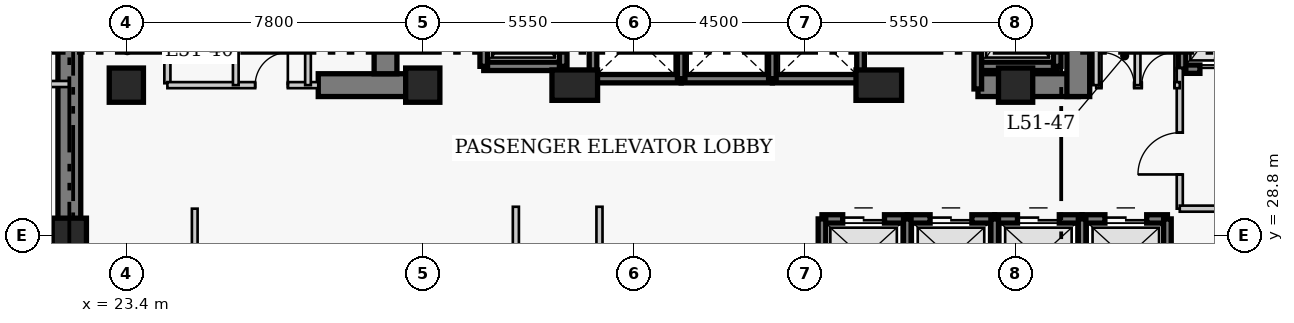
"""IFC4 building model, lengths in metres.
Left out: names, types, materials, properties, quantities, classifications, styles, units other than length and angle.
Written with IfcOpenShell. Run it as: python <this file> out.ifc"""

import sys

from ifc_helpers import new_model, si_unit, direction, frame, frame_2d, origin, origin_2d, place, context, subcontext, project, spatial, rectangle, extrude, element, fill, save


model = new_model("IFC4")
c1 = context("Model", 3, precision=1e-05, world=origin(), true_north=direction((0.0, 1.0)))
c2 = subcontext(c1, "Body", "Model", "MODEL_VIEW")
j1 = project(units=[si_unit("LENGTHUNIT", "METRE"), si_unit("PLANEANGLEUNIT", "RADIAN")], contexts=[c1])
p1 = place(None, origin())
s1 = spatial("IfcSite", under=j1, at=p1, CompositionType="ELEMENT")
p2 = place(p1, origin())
s2 = spatial("IfcBuilding", under=s1, at=p2, CompositionType="ELEMENT")
p3 = place(p2, frame((0.0, 0.0, 204.6)))
s3 = spatial("IfcBuildingStorey", under=s2, at=p3, CompositionType="ELEMENT", Elevation=204.6)
p4 = place(p3, frame((21.9, 27.05, 0.0), z_axis=(0.0, 0.0, 1.0), x_axis=(0.0, 1.0, 0.0)))
e1 = element("IfcWall", 1, at=p4, inside=s3, PredefinedType="SHEAR", context=c2, shape_type="SweptSolid", body=[
    extrude(rectangle(XDim=13.57, YDim=0.6, at=frame_2d((6.785, 0.0))), origin(), (0.0, 0.0, 1.0), 3.9),
])
p5 = place(p3, frame((28.45, 32.75, 0.0), z_axis=(0.0, 0.0, 1.0), x_axis=(1.0, 0.0, 0.0)))
e2 = element("IfcWall", 2, at=p5, inside=s3, PredefinedType="SHEAR", context=c2, shape_type="SweptSolid", body=[
    extrude(rectangle(XDim=2.4, YDim=0.6, at=frame_2d((1.2, 0.0))), origin(), (0.0, 0.0, 1.0), 3.9),
])
p6 = place(p3, frame((45.81, 32.75, 0.0), z_axis=(0.0, 0.0, 1.0), x_axis=(1.0, 0.0, 0.0)))
e3 = element("IfcWall", 3, at=p6, inside=s3, PredefinedType="SHEAR", context=c2, shape_type="SweptSolid", body=[
    extrude(rectangle(XDim=2.64, YDim=0.6, at=frame_2d((1.32, 0.0))), origin(), (0.0, 0.0, 1.0), 3.9),
])
p7 = place(p3, frame((30.22, 33.05, 0.0), z_axis=(0.0, 0.0, 1.0), x_axis=(0.0, 1.0, 0.0)))
e4 = element("IfcWall", 4, at=p7, inside=s3, PredefinedType="SHEAR", context=c2, shape_type="SweptSolid", body=[
    extrude(rectangle(XDim=7.27, YDim=0.6, at=frame_2d((3.635, 0.0))), origin(), (0.0, 0.0, 1.0), 3.9),
])
p8 = place(p3, frame((48.45, 32.45, 0.0), z_axis=(0.0, 0.0, 1.0), x_axis=(0.0, 1.0, 0.0)))
e5 = element("IfcWall", 5, at=p8, inside=s3, PredefinedType="SHEAR", context=c2, shape_type="SweptSolid", body=[
    extrude(rectangle(XDim=7.87, YDim=0.6, at=frame_2d((3.935, 0.0))), origin(), (0.0, 0.0, 1.0), 3.9),
])
p9 = place(p8, frame((5.75, 0.0, 0.0)))
e6 = element("IfcOpeningElement", 6, at=p9, cuts=e5, PredefinedType="OPENING", context=c2, shape_type="SweptSolid", body=[
    extrude(rectangle(XDim=1.1, YDim=2.15, at=frame_2d((0.55, 1.075))), frame((0.0, 0.31, 0.0), z_axis=(0.0, -1.0, 0.0), x_axis=(1.0, 0.0, 0.0)), (0.0, 0.0, 1.0), 0.62),
])
for number, where, z_axis, x_axis in (
    (7, (21.9, 28.8, 0.0), (0.0, 0.0, 1.0), (1.0, 0.0, 0.0)),
    (8, (23.4, 32.75, 0.0), (0.0, 0.0, 1.0), (1.0, 0.0, 0.0)),
    (9, (31.2, 32.75, 0.0), (0.0, 0.0, 1.0), (1.0, 0.0, 0.0)),
):
    element("IfcColumn", number, at=place(p3, frame(where, z_axis=z_axis, x_axis=x_axis)), inside=s3, PredefinedType="COLUMN", context=c2, shape_type="SweptSolid", body=[
        extrude(rectangle(XDim=0.9, YDim=0.9, at=origin_2d()), origin(), (0.0, 0.0, 1.0), 3.9),
    ])
for number, where, z_axis, x_axis in (
    (10, (35.2, 32.75, 0.0), (0.0, 0.0, 1.0), (1.0, 0.0, 0.0)),
    (11, (43.2, 32.75, 0.0), (0.0, 0.0, 1.0), (1.0, 0.0, 0.0)),
):
    element("IfcColumn", number, at=place(p3, frame(where, z_axis=z_axis, x_axis=x_axis)), inside=s3, PredefinedType="COLUMN", context=c2, shape_type="SweptSolid", body=[
        extrude(rectangle(XDim=1.2, YDim=0.8, at=origin_2d()), origin(), (0.0, 0.0, 1.0), 3.9),
    ])
p10 = place(p3, frame((46.8, 32.75, 0.0), z_axis=(0.0, 0.0, 1.0), x_axis=(1.0, 0.0, 0.0)))
e12 = element("IfcColumn", 12, at=p10, inside=s3, PredefinedType="COLUMN", context=c2, shape_type="SweptSolid", body=[
    extrude(rectangle(XDim=0.9, YDim=0.9, at=origin_2d()), origin(), (0.0, 0.0, 1.0), 3.9),
])
p11 = place(p3, frame((41.705, 29.23, 0.0), z_axis=(0.0, 0.0, 1.0), x_axis=(1.0, 0.0, 0.0)))
e13 = element("IfcWall", 13, at=p11, inside=s3, PredefinedType="SHEAR", context=c2, shape_type="SweptSolid", body=[
    extrude(rectangle(XDim=2.245, YDim=0.22, at=frame_2d((1.123, 0.0))), origin(), (0.0, 0.0, 1.0), 3.9),
])
p12 = place(p11, frame((0.545, 0.0, 0.0)))
e14 = element("IfcOpeningElement", 14, at=p12, cuts=e13, PredefinedType="OPENING", context=c2, shape_type="SweptSolid", body=[
    extrude(rectangle(XDim=1.1, YDim=2.15, at=frame_2d((0.55, 1.075))), frame((0.0, 0.12, 0.0), z_axis=(0.0, -1.0, 0.0), x_axis=(1.0, 0.0, 0.0)), (0.0, 0.0, 1.0), 0.24),
])
p13 = place(p3, frame((41.705, 27.17, 0.0), z_axis=(0.0, 0.0, 1.0), x_axis=(0.0, 1.0, 0.0)))
e15 = element("IfcWall", 15, at=p13, inside=s3, PredefinedType="SHEAR", context=c2, shape_type="SweptSolid", body=[
    extrude(rectangle(XDim=2.06, YDim=0.2, at=frame_2d((1.03, 0.0))), origin(), (0.0, 0.0, 1.0), 3.9),
])
p14 = place(p3, frame((43.95, 29.23, 0.0), z_axis=(0.0, 0.0, 1.0), x_axis=(1.0, 0.0, 0.0)))
e16 = element("IfcWall", 16, at=p14, inside=s3, PredefinedType="SHEAR", context=c2, shape_type="SweptSolid", body=[
    extrude(rectangle(XDim=2.3, YDim=0.22, at=frame_2d((1.15, 0.0))), origin(), (0.0, 0.0, 1.0), 3.9),
])
p15 = place(p14, frame((0.6, 0.0, 0.0)))
e17 = element("IfcOpeningElement", 17, at=p15, cuts=e16, PredefinedType="OPENING", context=c2, shape_type="SweptSolid", body=[
    extrude(rectangle(XDim=1.1, YDim=2.15, at=frame_2d((0.55, 1.075))), frame((0.0, 0.12, 0.0), z_axis=(0.0, -1.0, 0.0), x_axis=(1.0, 0.0, 0.0)), (0.0, 0.0, 1.0), 0.24),
])
p16 = place(p3, frame((43.95, 27.17, 0.0), z_axis=(0.0, 0.0, 1.0), x_axis=(0.0, 1.0, 0.0)))
e18 = element("IfcWall", 18, at=p16, inside=s3, PredefinedType="SHEAR", context=c2, shape_type="SweptSolid", body=[
    extrude(rectangle(XDim=2.06, YDim=0.2, at=frame_2d((1.03, 0.0))), origin(), (0.0, 0.0, 1.0), 3.9),
])
p17 = place(p3, frame((46.25, 29.23, 0.0), z_axis=(0.0, 0.0, 1.0), x_axis=(1.0, 0.0, 0.0)))
e19 = element("IfcWall", 19, at=p17, inside=s3, PredefinedType="SHEAR", context=c2, shape_type="SweptSolid", body=[
    extrude(rectangle(XDim=2.3, YDim=0.22, at=frame_2d((1.15, 0.0))), origin(), (0.0, 0.0, 1.0), 3.9),
])
p18 = place(p17, frame((0.6, 0.0, 0.0)))
e20 = element("IfcOpeningElement", 20, at=p18, cuts=e19, PredefinedType="OPENING", context=c2, shape_type="SweptSolid", body=[
    extrude(rectangle(XDim=1.1, YDim=2.15, at=frame_2d((0.55, 1.075))), frame((0.0, 0.12, 0.0), z_axis=(0.0, -1.0, 0.0), x_axis=(1.0, 0.0, 0.0)), (0.0, 0.0, 1.0), 0.24),
])
p19 = place(p3, frame((46.25, 27.17, 0.0), z_axis=(0.0, 0.0, 1.0), x_axis=(0.0, 1.0, 0.0)))
e21 = element("IfcWall", 21, at=p19, inside=s3, PredefinedType="SHEAR", context=c2, shape_type="SweptSolid", body=[
    extrude(rectangle(XDim=2.06, YDim=0.2, at=frame_2d((1.03, 0.0))), origin(), (0.0, 0.0, 1.0), 3.9),
])
p20 = place(p3, frame((48.55, 29.23, 0.0), z_axis=(0.0, 0.0, 1.0), x_axis=(1.0, 0.0, 0.0)))
e22 = element("IfcWall", 22, at=p20, inside=s3, PredefinedType="SHEAR", context=c2, shape_type="SweptSolid", body=[
    extrude(rectangle(XDim=2.245, YDim=0.22, at=frame_2d((1.123, 0.0))), origin(), (0.0, 0.0, 1.0), 3.9),
])
p21 = place(p20, frame((0.6, 0.0, 0.0)))
e23 = element("IfcOpeningElement", 23, at=p21, cuts=e22, PredefinedType="OPENING", context=c2, shape_type="SweptSolid", body=[
    extrude(rectangle(XDim=1.1, YDim=2.15, at=frame_2d((0.55, 1.075))), frame((0.0, 0.12, 0.0), z_axis=(0.0, -1.0, 0.0), x_axis=(1.0, 0.0, 0.0)), (0.0, 0.0, 1.0), 0.24),
])
for number, where, z_axis, x_axis in (
    (24, (48.55, 27.17, 0.0), (0.0, 0.0, 1.0), (0.0, 1.0, 0.0)),
    (25, (50.795, 27.17, 0.0), (0.0, 0.0, 1.0), (0.0, 1.0, 0.0)),
):
    element("IfcWall", number, at=place(p3, frame(where, z_axis=z_axis, x_axis=x_axis)), inside=s3, PredefinedType="SHEAR", context=c2, shape_type="SweptSolid", body=[
        extrude(rectangle(XDim=2.06, YDim=0.2, at=frame_2d((1.03, 0.0))), origin(), (0.0, 0.0, 1.0), 3.9),
    ])
p22 = place(p3, frame((35.68, 32.92, 0.0), z_axis=(0.0, 0.0, 1.0), x_axis=(1.0, 0.0, 0.0)))
e26 = element("IfcWall", 26, at=p22, inside=s3, PredefinedType="SHEAR", context=c2, shape_type="SweptSolid", body=[
    extrude(rectangle(XDim=2.32, YDim=0.22, at=frame_2d((1.16, 0.0))), origin(), (0.0, 0.0, 1.0), 3.9),
])
p23 = place(p3, frame((35.68, 32.92, 0.0), z_axis=(0.0, 0.0, 1.0), x_axis=(0.0, 1.0, 0.0)))
e27 = element("IfcWall", 27, at=p23, inside=s3, PredefinedType="SHEAR", context=c2, shape_type="SweptSolid", body=[
    extrude(rectangle(XDim=2.16, YDim=0.2, at=frame_2d((1.08, 0.0))), origin(), (0.0, 0.0, 1.0), 3.9),
])
p24 = place(p3, frame((38.0, 32.92, 0.0), z_axis=(0.0, 0.0, 1.0), x_axis=(1.0, 0.0, 0.0)))
e28 = element("IfcWall", 28, at=p24, inside=s3, PredefinedType="SHEAR", context=c2, shape_type="SweptSolid", body=[
    extrude(rectangle(XDim=2.4, YDim=0.22, at=frame_2d((1.2, 0.0))), origin(), (0.0, 0.0, 1.0), 3.9),
])
p25 = place(p3, frame((38.0, 32.92, 0.0), z_axis=(0.0, 0.0, 1.0), x_axis=(0.0, 1.0, 0.0)))
e29 = element("IfcWall", 29, at=p25, inside=s3, PredefinedType="SHEAR", context=c2, shape_type="SweptSolid", body=[
    extrude(rectangle(XDim=2.16, YDim=0.2, at=frame_2d((1.08, 0.0))), origin(), (0.0, 0.0, 1.0), 3.9),
])
p26 = place(p3, frame((40.4, 32.92, 0.0), z_axis=(0.0, 0.0, 1.0), x_axis=(1.0, 0.0, 0.0)))
e30 = element("IfcWall", 30, at=p26, inside=s3, PredefinedType="SHEAR", context=c2, shape_type="SweptSolid", body=[
    extrude(rectangle(XDim=2.32, YDim=0.22, at=frame_2d((1.16, 0.0))), origin(), (0.0, 0.0, 1.0), 3.9),
])
for number, where, z_axis, x_axis in (
    (31, (40.4, 32.92, 0.0), (0.0, 0.0, 1.0), (0.0, 1.0, 0.0)),
    (32, (42.72, 32.92, 0.0), (0.0, 0.0, 1.0), (0.0, 1.0, 0.0)),
):
    element("IfcWall", number, at=place(p3, frame(where, z_axis=z_axis, x_axis=x_axis)), inside=s3, PredefinedType="SHEAR", context=c2, shape_type="SweptSolid", body=[
        extrude(rectangle(XDim=2.16, YDim=0.2, at=frame_2d((1.08, 0.0))), origin(), (0.0, 0.0, 1.0), 3.9),
    ])
p27 = place(p3, frame((51.18, 33.17, 0.0), z_axis=(0.0, 0.0, 1.0), x_axis=(1.0, 0.0, 0.0)))
e33 = element("IfcWall", 33, at=p27, inside=s3, PredefinedType="SHEAR", context=c2, shape_type="SweptSolid", body=[
    extrude(rectangle(XDim=2.42, YDim=0.22, at=frame_2d((1.21, 0.0))), origin(), (0.0, 0.0, 1.0), 3.9),
])
p28 = place(p27, frame((0.47, 0.0, 0.0)))
e34 = element("IfcOpeningElement", 34, at=p28, cuts=e33, PredefinedType="OPENING", context=c2, shape_type="SweptSolid", body=[
    extrude(rectangle(XDim=1.3, YDim=2.15, at=frame_2d((0.65, 1.075))), frame((0.0, 0.12, 0.0), z_axis=(0.0, -1.0, 0.0), x_axis=(1.0, 0.0, 0.0)), (0.0, 0.0, 1.0), 0.24),
])
p29 = place(p3, frame((51.18, 33.17, 0.0), z_axis=(0.0, 0.0, 1.0), x_axis=(0.0, 1.0, 0.0)))
e35 = element("IfcWall", 35, at=p29, inside=s3, PredefinedType="SHEAR", context=c2, shape_type="SweptSolid", body=[
    extrude(rectangle(XDim=2.86, YDim=0.2, at=frame_2d((1.43, 0.0))), origin(), (0.0, 0.0, 1.0), 3.9),
])
p30 = place(p3, frame((32.805, 33.245, 0.0), z_axis=(0.0, 0.0, 1.0), x_axis=(1.0, 0.0, 0.0)))
e36 = element("IfcWall", 36, at=p30, inside=s3, PredefinedType="SHEAR", context=c2, shape_type="SweptSolid", body=[
    extrude(rectangle(XDim=2.09, YDim=0.22, at=frame_2d((1.045, 0.0))), origin(), (0.0, 0.0, 1.0), 3.9),
])
for number, where, z_axis, x_axis in (
    (37, (32.805, 33.245, 0.0), (0.0, 0.0, 1.0), (0.0, 1.0, 0.0)),
    (38, (34.895, 33.245, 0.0), (0.0, 0.0, 1.0), (0.0, 1.0, 0.0)),
):
    element("IfcWall", number, at=place(p3, frame(where, z_axis=z_axis, x_axis=x_axis)), inside=s3, PredefinedType="SHEAR", context=c2, shape_type="SweptSolid", body=[
        extrude(rectangle(XDim=2.91, YDim=0.2, at=frame_2d((1.455, 0.0))), origin(), (0.0, 0.0, 1.0), 3.9),
    ])
p31 = place(p3, frame((45.805, 33.245, 0.0), z_axis=(0.0, 0.0, 1.0), x_axis=(1.0, 0.0, 0.0)))
e39 = element("IfcWall", 39, at=p31, inside=s3, PredefinedType="SHEAR", context=c2, shape_type="SweptSolid", body=[
    extrude(rectangle(XDim=2.09, YDim=0.22, at=frame_2d((1.045, 0.0))), origin(), (0.0, 0.0, 1.0), 3.9),
])
p32 = place(p3, frame((45.805, 32.65, 0.0), z_axis=(0.0, 0.0, 1.0), x_axis=(0.0, 1.0, 0.0)))
e40 = element("IfcWall", 40, at=p32, inside=s3, PredefinedType="SHEAR", context=c2, shape_type="SweptSolid", body=[
    extrude(rectangle(XDim=3.505, YDim=0.2, at=frame_2d((1.752, 0.0))), origin(), (0.0, 0.0, 1.0), 3.9),
])
p33 = place(p3, frame((47.895, 33.245, 0.0), z_axis=(0.0, 0.0, 1.0), x_axis=(0.0, 1.0, 0.0)))
e41 = element("IfcWall", 41, at=p33, inside=s3, PredefinedType="SHEAR", context=c2, shape_type="SweptSolid", body=[
    extrude(rectangle(XDim=2.91, YDim=0.2, at=frame_2d((1.455, 0.0))), origin(), (0.0, 0.0, 1.0), 3.9),
])
p34 = place(p3, frame((24.48, 32.8, 0.0), z_axis=(0.0, 0.0, 1.0), x_axis=(0.0, 1.0, 0.0)))
e42 = element("IfcWall", 42, at=p34, inside=s3, PredefinedType="PARTITIONING", context=c2, shape_type="SweptSolid", body=[
    extrude(rectangle(XDim=3.57, YDim=0.16, at=frame_2d((1.785, 0.0))), origin(), (0.0, 0.0, 1.0), 3.65),
])
p35 = place(p34, frame((1.604, 0.0, 0.0)))
e43 = element("IfcOpeningElement", 43, at=p35, cuts=e42, PredefinedType="OPENING", context=c2, shape_type="SweptSolid", body=[
    extrude(rectangle(XDim=0.9, YDim=2.1, at=frame_2d((0.45, 1.05))), frame((0.0, 0.09, 0.0), z_axis=(0.0, -1.0, 0.0), x_axis=(1.0, 0.0, 0.0)), (0.0, 0.0, 1.0), 0.18),
])
p36 = place(p3, frame((51.12, 29.5, 0.0), z_axis=(0.0, 0.0, 1.0), x_axis=(0.0, 1.0, 0.0)))
e44 = element("IfcWall", 44, at=p36, inside=s3, PredefinedType="PARTITIONING", context=c2, shape_type="SweptSolid", body=[
    extrude(rectangle(XDim=3.7, YDim=0.16, at=frame_2d((1.85, 0.0))), origin(), (0.0, 0.0, 1.0), 3.65),
])
p37 = place(p36, frame((0.9, 0.0, 0.0)))
e45 = element("IfcOpeningElement", 45, at=p37, cuts=e44, PredefinedType="OPENING", context=c2, shape_type="SweptSolid", body=[
    extrude(rectangle(XDim=1.1, YDim=2.15, at=frame_2d((0.55, 1.075))), frame((0.0, 0.09, 0.0), z_axis=(0.0, -1.0, 0.0), x_axis=(1.0, 0.0, 0.0)), (0.0, 0.0, 1.0), 0.18),
])
p38 = place(p3, frame((51.12, 29.5, 0.0), z_axis=(0.0, 0.0, 1.0), x_axis=(1.0, 0.0, 0.0)))
e46 = element("IfcWall", 46, at=p38, inside=s3, PredefinedType="PARTITIONING", context=c2, shape_type="SweptSolid", body=[
    extrude(rectangle(XDim=5.63, YDim=0.16, at=frame_2d((2.815, 0.0))), origin(), (0.0, 0.0, 1.0), 3.65),
])
p39 = place(p3, frame((24.48, 32.75, 0.0), z_axis=(0.0, 0.0, 1.0), x_axis=(1.0, 0.0, 0.0)))
e47 = element("IfcWall", 47, at=p39, inside=s3, PredefinedType="PARTITIONING", context=c2, shape_type="SweptSolid", body=[
    extrude(rectangle(XDim=3.97, YDim=0.16, at=frame_2d((1.985, 0.0))), origin(), (0.0, 0.0, 1.0), 3.65),
])
p40 = place(p39, frame((2.31, 0.0, 0.0)))
e48 = element("IfcOpeningElement", 48, at=p40, cuts=e47, PredefinedType="OPENING", context=c2, shape_type="SweptSolid", body=[
    extrude(rectangle(XDim=0.86, YDim=2.05, at=frame_2d((0.43, 1.025))), frame((0.0, 0.09, 0.0), z_axis=(0.0, -1.0, 0.0), x_axis=(1.0, 0.0, 0.0)), (0.0, 0.0, 1.0), 0.18),
])
p41 = place(p3, frame((48.92, 32.75, 0.0), z_axis=(0.0, 0.0, 1.0), x_axis=(1.0, 0.0, 0.0)))
e49 = element("IfcWall", 49, at=p41, inside=s3, PredefinedType="PARTITIONING", context=c2, shape_type="SweptSolid", body=[
    extrude(rectangle(XDim=2.2, YDim=0.16, at=frame_2d((1.1, 0.0))), origin(), (0.0, 0.0, 1.0), 3.65),
])
p42 = place(p41, frame((0.14, 0.0, 0.0)))
e50 = element("IfcOpeningElement", 50, at=p42, cuts=e49, PredefinedType="OPENING", context=c2, shape_type="SweptSolid", body=[
    extrude(rectangle(XDim=0.86, YDim=2.05, at=frame_2d((0.43, 1.025))), frame((0.0, 0.09, 0.0), z_axis=(0.0, -1.0, 0.0), x_axis=(1.0, 0.0, 0.0)), (0.0, 0.0, 1.0), 0.18),
])
p43 = place(p41, frame((1.2, 0.0, 0.0)))
e51 = element("IfcOpeningElement", 51, at=p43, cuts=e49, PredefinedType="OPENING", context=c2, shape_type="SweptSolid", body=[
    extrude(rectangle(XDim=0.86, YDim=2.05, at=frame_2d((0.43, 1.025))), frame((0.0, 0.09, 0.0), z_axis=(0.0, -1.0, 0.0), x_axis=(1.0, 0.0, 0.0)), (0.0, 0.0, 1.0), 0.18),
])
for number, where, z_axis, x_axis in (
    (52, (48.92, 32.75, 0.0), (0.0, 0.0, 1.0), (0.0, 1.0, 0.0)),
    (53, (26.28, 32.75, 0.0), (0.0, 0.0, 1.0), (0.0, 1.0, 0.0)),
    (54, (28.18, 32.75, 0.0), (0.0, 0.0, 1.0), (0.0, 1.0, 0.0)),
    (55, (50.01, 32.75, 0.0), (0.0, 0.0, 1.0), (0.0, 1.0, 0.0)),
):
    element("IfcWall", number, at=place(p3, frame(where, z_axis=z_axis, x_axis=x_axis)), inside=s3, PredefinedType="PARTITIONING", context=c2, shape_type="SweptSolid", body=[
        extrude(rectangle(XDim=3.62, YDim=0.15, at=frame_2d((1.81, 0.0))), origin(), (0.0, 0.0, 1.0), 3.65),
    ])
for number, where, z_axis, x_axis in (
    (56, (33.65, 16.86, 0.0), (0.0, 0.0, 1.0), (0.0, 1.0, 0.0)),
    (57, (35.85, 16.86, 0.0), (0.0, 0.0, 1.0), (0.0, 1.0, 0.0)),
):
    element("IfcWall", number, at=place(p3, frame(where, z_axis=z_axis, x_axis=x_axis)), inside=s3, PredefinedType="PARTITIONING", context=c2, shape_type="SweptSolid", body=[
        extrude(rectangle(XDim=12.69, YDim=0.16, at=frame_2d((6.345, 0.0))), origin(), (0.0, 0.0, 1.0), 3.65),
    ])
p44 = place(p3, frame((18.86, 32.78, 0.0), z_axis=(0.0, 0.0, 1.0), x_axis=(1.0, 0.0, 0.0)))
e58 = element("IfcWall", 58, at=p44, inside=s3, PredefinedType="PARTITIONING", context=c2, shape_type="SweptSolid", body=[
    extrude(rectangle(XDim=3.04, YDim=0.16, at=frame_2d((1.52, 0.0))), origin(), (0.0, 0.0, 1.0), 3.65),
])
p45 = place(p3, frame((25.2, 16.86, 0.0), z_axis=(0.0, 0.0, 1.0), x_axis=(0.0, 1.0, 0.0)))
e59 = element("IfcWall", 59, at=p45, inside=s3, PredefinedType="PARTITIONING", context=c2, shape_type="SweptSolid", body=[
    extrude(rectangle(XDim=12.64, YDim=0.15, at=frame_2d((6.32, 0.0))), origin(), (0.0, 0.0, 1.0), 3.65),
])
p46 = place(p12, origin())
e60 = element("IfcDoor", 60, at=p46, inside=s3, OperationType="DOUBLE_DOOR_SLIDING", PredefinedType="DOOR", context=c2, shape_type="SweptSolid", body=[
    extrude(rectangle(XDim=1.1, YDim=2.15, at=frame_2d((0.55, 1.075))), frame((0.0, 0.025, 0.0), z_axis=(0.0, -1.0, 0.0), x_axis=(1.0, 0.0, 0.0)), (0.0, 0.0, 1.0), 0.05),
])
fill(e14, e60)
p47 = place(p15, origin())
e61 = element("IfcDoor", 61, at=p47, inside=s3, OperationType="DOUBLE_DOOR_SLIDING", PredefinedType="DOOR", context=c2, shape_type="SweptSolid", body=[
    extrude(rectangle(XDim=1.1, YDim=2.15, at=frame_2d((0.55, 1.075))), frame((0.0, 0.025, 0.0), z_axis=(0.0, -1.0, 0.0), x_axis=(1.0, 0.0, 0.0)), (0.0, 0.0, 1.0), 0.05),
])
fill(e17, e61)
p48 = place(p18, origin())
e62 = element("IfcDoor", 62, at=p48, inside=s3, OperationType="DOUBLE_DOOR_SLIDING", PredefinedType="DOOR", context=c2, shape_type="SweptSolid", body=[
    extrude(rectangle(XDim=1.1, YDim=2.15, at=frame_2d((0.55, 1.075))), frame((0.0, 0.025, 0.0), z_axis=(0.0, -1.0, 0.0), x_axis=(1.0, 0.0, 0.0)), (0.0, 0.0, 1.0), 0.05),
])
fill(e20, e62)
p49 = place(p21, origin())
e63 = element("IfcDoor", 63, at=p49, inside=s3, OperationType="DOUBLE_DOOR_SLIDING", PredefinedType="DOOR", context=c2, shape_type="SweptSolid", body=[
    extrude(rectangle(XDim=1.1, YDim=2.15, at=frame_2d((0.55, 1.075))), frame((0.0, 0.025, 0.0), z_axis=(0.0, -1.0, 0.0), x_axis=(1.0, 0.0, 0.0)), (0.0, 0.0, 1.0), 0.05),
])
fill(e23, e63)
p50 = place(p28, origin())
e64 = element("IfcDoor", 64, at=p50, inside=s3, OperationType="DOUBLE_DOOR_SLIDING", PredefinedType="DOOR", context=c2, shape_type="SweptSolid", body=[
    extrude(rectangle(XDim=1.3, YDim=2.15, at=frame_2d((0.65, 1.075))), frame((0.0, 0.025, 0.0), z_axis=(0.0, -1.0, 0.0), x_axis=(1.0, 0.0, 0.0)), (0.0, 0.0, 1.0), 0.05),
])
fill(e34, e64)
p51 = place(p37, origin())
e65 = element("IfcDoor", 65, at=p51, inside=s3, OperationType="SINGLE_SWING_LEFT", PredefinedType="DOOR", context=c2, shape_type="SweptSolid", body=[
    extrude(rectangle(XDim=1.1, YDim=2.15, at=frame_2d((0.55, 1.075))), frame((0.0, 0.025, 0.0), z_axis=(0.0, -1.0, 0.0), x_axis=(1.0, 0.0, 0.0)), (0.0, 0.0, 1.0), 0.05),
])
fill(e45, e65)
p52 = place(p40, origin())
e66 = element("IfcDoor", 66, at=p52, inside=s3, OperationType="SINGLE_SWING_RIGHT", PredefinedType="DOOR", context=c2, shape_type="SweptSolid", body=[
    extrude(rectangle(XDim=0.86, YDim=2.05, at=frame_2d((0.43, 1.025))), frame((0.0, 0.025, 0.0), z_axis=(0.0, -1.0, 0.0), x_axis=(1.0, 0.0, 0.0)), (0.0, 0.0, 1.0), 0.05),
])
fill(e48, e66)
p53 = place(p42, origin())
e67 = element("IfcDoor", 67, at=p53, inside=s3, OperationType="SINGLE_SWING_LEFT", PredefinedType="DOOR", context=c2, shape_type="SweptSolid", body=[
    extrude(rectangle(XDim=0.86, YDim=2.05, at=frame_2d((0.43, 1.025))), frame((0.0, 0.025, 0.0), z_axis=(0.0, -1.0, 0.0), x_axis=(1.0, 0.0, 0.0)), (0.0, 0.0, 1.0), 0.05),
])
fill(e50, e67)
p54 = place(p43, origin())
e68 = element("IfcDoor", 68, at=p54, inside=s3, OperationType="SINGLE_SWING_RIGHT", PredefinedType="DOOR", context=c2, shape_type="SweptSolid", body=[
    extrude(rectangle(XDim=0.86, YDim=2.05, at=frame_2d((0.43, 1.025))), frame((0.0, 0.025, 0.0), z_axis=(0.0, -1.0, 0.0), x_axis=(1.0, 0.0, 0.0)), (0.0, 0.0, 1.0), 0.05),
])
fill(e51, e68)
save(model, sys.argv[1])
